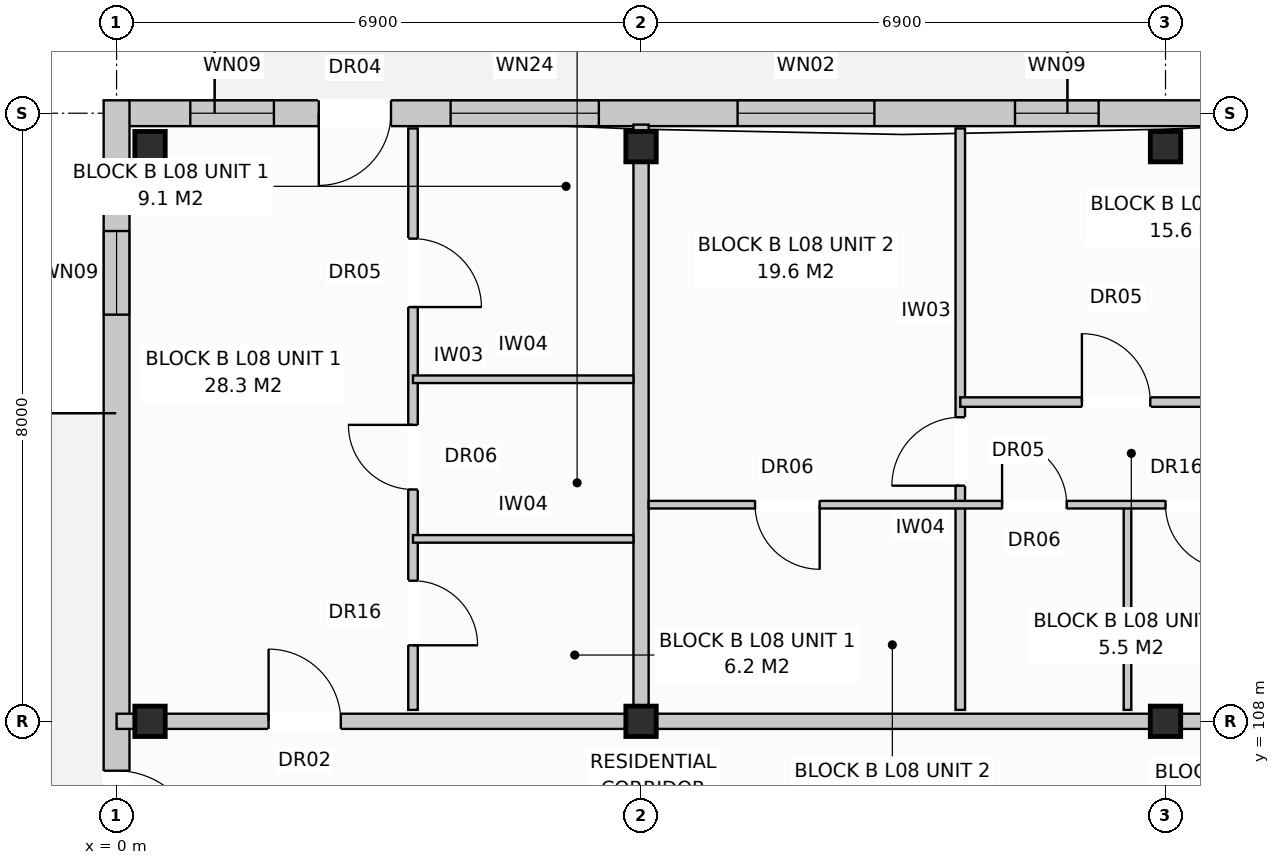
"""IFC4 building model, lengths in metres.
Left out: names, types, materials, properties, quantities, classifications, styles, units other than length and angle.
Written with IfcOpenShell. Run it as: python <this file> out.ifc"""

import sys

from ifc_helpers import new_model, si_unit, direction, frame, frame_2d, origin, origin_with_axes, origin_2d, place, context, subcontext, project, spatial, rectangle, extrude, element, fill, save


model = new_model("IFC4")
c1 = context("Model", 3, precision=1e-05, world=origin(), true_north=direction((0.0, 1.0)))
c2 = subcontext(c1, "Body", "Model", "MODEL_VIEW")
j1 = project(units=[si_unit("LENGTHUNIT", "METRE"), si_unit("PLANEANGLEUNIT", "RADIAN")], contexts=[c1])
p1 = place(None, origin())
s1 = spatial("IfcSite", under=j1, at=p1, CompositionType="ELEMENT")
p2 = place(p1, origin())
s2 = spatial("IfcBuilding", under=s1, at=p2, CompositionType="ELEMENT")
p3 = place(p2, frame((0.0, 0.0, 27.2)))
s3 = spatial("IfcBuildingStorey", under=s2, at=p3, CompositionType="ELEMENT", Elevation=27.2)
for number, where, z_axis, x_axis in (
    (1, (0.44, 108.0, 0.0), (0.0, 0.0, 1.0), (1.0, 0.0, 0.0)),
    (2, (0.44, 115.56, 0.0), (0.0, 0.0, 1.0), (1.0, 0.0, 0.0)),
    (3, (6.9, 108.0, 0.0), (0.0, 0.0, 1.0), (1.0, 0.0, 0.0)),
    (4, (6.9, 115.56, 0.0), (0.0, 0.0, 1.0), (1.0, 0.0, 0.0)),
    (5, (13.8, 108.0, 0.0), (0.0, 0.0, 1.0), (1.0, 0.0, 0.0)),
    (6, (13.8, 115.56, 0.0), (0.0, 0.0, 1.0), (1.0, 0.0, 0.0)),
):
    element("IfcColumn", number, at=place(p3, frame(where, z_axis=z_axis, x_axis=x_axis)), inside=s3, PredefinedType="COLUMN", context=c2, shape_type="SweptSolid", body=[
        extrude(rectangle(XDim=0.4, YDim=0.4, at=origin_2d()), origin(), (0.0, 0.0, 1.0), 3.2),
    ])
p4 = place(p3, frame((0.16, 116.0, 0.0), z_axis=(0.0, 0.0, 1.0), x_axis=(1.0, 0.0, 0.0)))
e7 = element("IfcWall", 7, at=p4, inside=s3, PredefinedType="STANDARD", context=c2, shape_type="SweptSolid", body=[
    extrude(rectangle(XDim=41.08, YDim=0.34, at=frame_2d((20.54, 0.0))), origin(), (0.0, 0.0, 1.0), 2.96),
])
p5 = place(p4, frame((2.5, 0.0, 0.0)))
e8 = element("IfcOpeningElement", 8, at=p5, cuts=e7, PredefinedType="OPENING", context=c2, shape_type="SweptSolid", body=[
    extrude(rectangle(XDim=0.95, YDim=2.1, at=frame_2d((0.475, 1.05))), frame((0.0, 0.182, 0.0), z_axis=(0.0, -1.0, 0.0), x_axis=(1.0, 0.0, 0.0)), (0.0, 0.0, 1.0), 0.364),
])
p6 = place(p4, frame((18.91, 0.0, 0.0)))
e9 = element("IfcOpeningElement", 9, at=p6, cuts=e7, PredefinedType="OPENING", context=c2, shape_type="SweptSolid", body=[
    extrude(rectangle(XDim=0.95, YDim=2.1, at=frame_2d((0.475, 1.05))), frame((0.0, 0.182, 0.0), z_axis=(0.0, -1.0, 0.0), x_axis=(1.0, 0.0, 0.0)), (0.0, 0.0, 1.0), 0.364),
])
p7 = place(p4, frame((32.71, 0.0, 0.0)))
e10 = element("IfcOpeningElement", 10, at=p7, cuts=e7, PredefinedType="OPENING", context=c2, shape_type="SweptSolid", body=[
    extrude(rectangle(XDim=0.95, YDim=2.1, at=frame_2d((0.475, 1.05))), frame((0.0, 0.182, 0.0), z_axis=(0.0, -1.0, 0.0), x_axis=(1.0, 0.0, 0.0)), (0.0, 0.0, 1.0), 0.364),
])
p8 = place(p4, frame((0.81, 0.0, 0.72)))
e11 = element("IfcOpeningElement", 11, at=p8, cuts=e7, PredefinedType="OPENING", context=c2, shape_type="SweptSolid", body=[
    extrude(rectangle(XDim=1.1, YDim=1.5, at=frame_2d((0.55, 0.75))), frame((0.0, 0.182, 0.0), z_axis=(0.0, -1.0, 0.0), x_axis=(1.0, 0.0, 0.0)), (0.0, 0.0, 1.0), 0.364),
])
p9 = place(p4, frame((4.235, 0.0, 0.8)))
e12 = element("IfcOpeningElement", 12, at=p9, cuts=e7, PredefinedType="OPENING", context=c2, shape_type="SweptSolid", body=[
    extrude(rectangle(XDim=1.95, YDim=1.65, at=frame_2d((0.975, 0.825))), frame((0.0, 0.182, 0.0), z_axis=(0.0, -1.0, 0.0), x_axis=(1.0, 0.0, 0.0)), (0.0, 0.0, 1.0), 0.364),
])
p10 = place(p4, frame((8.01, 0.0, 0.8)))
e13 = element("IfcOpeningElement", 13, at=p10, cuts=e7, PredefinedType="OPENING", context=c2, shape_type="SweptSolid", body=[
    extrude(rectangle(XDim=1.8, YDim=1.7, at=frame_2d((0.9, 0.85))), frame((0.0, 0.182, 0.0), z_axis=(0.0, -1.0, 0.0), x_axis=(1.0, 0.0, 0.0)), (0.0, 0.0, 1.0), 0.364),
])
p11 = place(p4, frame((11.66, 0.0, 0.72)))
e14 = element("IfcOpeningElement", 14, at=p11, cuts=e7, PredefinedType="OPENING", context=c2, shape_type="SweptSolid", body=[
    extrude(rectangle(XDim=1.1, YDim=1.5, at=frame_2d((0.55, 0.75))), frame((0.0, 0.182, 0.0), z_axis=(0.0, -1.0, 0.0), x_axis=(1.0, 0.0, 0.0)), (0.0, 0.0, 1.0), 0.364),
])
p12 = place(p4, frame((16.735, 0.0, 0.8)))
e15 = element("IfcOpeningElement", 15, at=p12, cuts=e7, PredefinedType="OPENING", context=c2, shape_type="SweptSolid", body=[
    extrude(rectangle(XDim=1.95, YDim=1.65, at=frame_2d((0.975, 0.825))), frame((0.0, 0.182, 0.0), z_axis=(0.0, -1.0, 0.0), x_axis=(1.0, 0.0, 0.0)), (0.0, 0.0, 1.0), 0.364),
])
p13 = place(p4, frame((22.31, 0.0, 0.8)))
e16 = element("IfcOpeningElement", 16, at=p13, cuts=e7, PredefinedType="OPENING", context=c2, shape_type="SweptSolid", body=[
    extrude(rectangle(XDim=1.8, YDim=1.7, at=frame_2d((0.9, 0.85))), frame((0.0, 0.182, 0.0), z_axis=(0.0, -1.0, 0.0), x_axis=(1.0, 0.0, 0.0)), (0.0, 0.0, 1.0), 0.364),
])
p14 = place(p4, frame((28.36, 0.0, 0.72)))
e17 = element("IfcOpeningElement", 17, at=p14, cuts=e7, PredefinedType="OPENING", context=c2, shape_type="SweptSolid", body=[
    extrude(rectangle(XDim=1.1, YDim=1.5, at=frame_2d((0.55, 0.75))), frame((0.0, 0.182, 0.0), z_axis=(0.0, -1.0, 0.0), x_axis=(1.0, 0.0, 0.0)), (0.0, 0.0, 1.0), 0.364),
])
p15 = place(p4, frame((30.435, 0.0, 0.8)))
e18 = element("IfcOpeningElement", 18, at=p15, cuts=e7, PredefinedType="OPENING", context=c2, shape_type="SweptSolid", body=[
    extrude(rectangle(XDim=1.95, YDim=1.65, at=frame_2d((0.975, 0.825))), frame((0.0, 0.182, 0.0), z_axis=(0.0, -1.0, 0.0), x_axis=(1.0, 0.0, 0.0)), (0.0, 0.0, 1.0), 0.364),
])
p16 = place(p4, frame((35.61, 0.0, 0.8)))
e19 = element("IfcOpeningElement", 19, at=p16, cuts=e7, PredefinedType="OPENING", context=c2, shape_type="SweptSolid", body=[
    extrude(rectangle(XDim=1.8, YDim=1.7, at=frame_2d((0.9, 0.85))), frame((0.0, 0.182, 0.0), z_axis=(0.0, -1.0, 0.0), x_axis=(1.0, 0.0, 0.0)), (0.0, 0.0, 1.0), 0.364),
])
p17 = place(p4, frame((39.26, 0.0, 0.72)))
e20 = element("IfcOpeningElement", 20, at=p17, cuts=e7, PredefinedType="OPENING", context=c2, shape_type="SweptSolid", body=[
    extrude(rectangle(XDim=1.1, YDim=1.5, at=frame_2d((0.55, 0.75))), frame((0.0, 0.182, 0.0), z_axis=(0.0, -1.0, 0.0), x_axis=(1.0, 0.0, 0.0)), (0.0, 0.0, 1.0), 0.364),
])
p18 = place(p3, frame((0.0, 97.43, 0.0), z_axis=(0.0, 0.0, 1.0), x_axis=(0.0, 1.0, 0.0)))
e21 = element("IfcWall", 21, at=p18, inside=s3, PredefinedType="STANDARD", context=c2, shape_type="SweptSolid", body=[
    extrude(rectangle(XDim=18.74, YDim=0.34, at=frame_2d((9.37, 0.0))), origin(), (0.0, 0.0, 1.0), 2.96),
])
p19 = place(p18, frame((8.82, 0.0, 0.0)))
e22 = element("IfcOpeningElement", 22, at=p19, cuts=e21, PredefinedType="OPENING", context=c2, shape_type="SweptSolid", body=[
    extrude(rectangle(XDim=1.1, YDim=2.1, at=frame_2d((0.55, 1.05))), frame((0.0, 0.182, 0.0), z_axis=(0.0, -1.0, 0.0), x_axis=(1.0, 0.0, 0.0)), (0.0, 0.0, 1.0), 0.364),
])
p20 = place(p18, frame((1.72, 0.0, 0.72)))
e23 = element("IfcOpeningElement", 23, at=p20, cuts=e21, PredefinedType="OPENING", context=c2, shape_type="SweptSolid", body=[
    extrude(rectangle(XDim=1.1, YDim=1.5, at=frame_2d((0.55, 0.75))), frame((0.0, 0.182, 0.0), z_axis=(0.0, -1.0, 0.0), x_axis=(1.0, 0.0, 0.0)), (0.0, 0.0, 1.0), 0.364),
])
p21 = place(p18, frame((15.92, 0.0, 0.72)))
e24 = element("IfcOpeningElement", 24, at=p21, cuts=e21, PredefinedType="OPENING", context=c2, shape_type="SweptSolid", body=[
    extrude(rectangle(XDim=1.1, YDim=1.5, at=frame_2d((0.55, 0.75))), frame((0.0, 0.182, 0.0), z_axis=(0.0, -1.0, 0.0), x_axis=(1.0, 0.0, 0.0)), (0.0, 0.0, 1.0), 0.364),
])
p22 = place(p3, frame((6.9, 108.15, 0.0), z_axis=(0.0, 0.0, 1.0), x_axis=(0.0, 1.0, 0.0)))
e25 = element("IfcWall", 25, at=p22, inside=s3, PredefinedType="PARTITIONING", context=c2, shape_type="SweptSolid", body=[
    extrude(rectangle(XDim=7.7, YDim=0.2, at=frame_2d((3.85, 0.0))), origin(), (0.0, 0.0, 1.0), 2.4),
])
p23 = place(p3, frame((0.0, 108.0, 0.0), z_axis=(0.0, 0.0, 1.0), x_axis=(1.0, 0.0, 0.0)))
e26 = element("IfcWall", 26, at=p23, inside=s3, PredefinedType="PARTITIONING", context=c2, shape_type="SweptSolid", body=[
    extrude(rectangle(XDim=6.9, YDim=0.2, at=frame_2d((3.45, 0.0))), origin(), (0.0, 0.0, 1.0), 2.4),
])
p24 = place(p23, frame((2.0, 0.0, 0.0)))
e27 = element("IfcOpeningElement", 27, at=p24, cuts=e26, PredefinedType="OPENING", context=c2, shape_type="SweptSolid", body=[
    extrude(rectangle(XDim=0.95, YDim=2.15, at=frame_2d((0.475, 1.075))), frame((0.0, 0.112, 0.0), z_axis=(0.0, -1.0, 0.0), x_axis=(1.0, 0.0, 0.0)), (0.0, 0.0, 1.0), 0.224),
])
p25 = place(p3, frame((3.9, 108.15, 0.0), z_axis=(0.0, 0.0, 1.0), x_axis=(0.0, 1.0, 0.0)))
e28 = element("IfcWall", 28, at=p25, inside=s3, PredefinedType="PARTITIONING", context=c2, shape_type="SweptSolid", body=[
    extrude(rectangle(XDim=7.65, YDim=0.125, at=frame_2d((3.825, 0.0))), origin(), (0.0, 0.0, 1.0), 2.96),
])
p26 = place(p25, frame((0.85, 0.0, 0.0)))
e29 = element("IfcOpeningElement", 29, at=p26, cuts=e28, PredefinedType="OPENING", context=c2, shape_type="SweptSolid", body=[
    extrude(rectangle(XDim=0.85, YDim=2.1, at=frame_2d((0.425, 1.05))), frame((0.0, 0.074, 0.0), z_axis=(0.0, -1.0, 0.0), x_axis=(1.0, 0.0, 0.0)), (0.0, 0.0, 1.0), 0.149),
])
p27 = place(p25, frame((2.9, 0.0, 0.0)))
e30 = element("IfcOpeningElement", 30, at=p27, cuts=e28, PredefinedType="OPENING", context=c2, shape_type="SweptSolid", body=[
    extrude(rectangle(XDim=0.85, YDim=2.05, at=frame_2d((0.425, 1.025))), frame((0.0, 0.074, 0.0), z_axis=(0.0, -1.0, 0.0), x_axis=(1.0, 0.0, 0.0)), (0.0, 0.0, 1.0), 0.149),
])
p28 = place(p25, frame((5.3, 0.0, 0.0)))
e31 = element("IfcOpeningElement", 31, at=p28, cuts=e28, PredefinedType="OPENING", context=c2, shape_type="SweptSolid", body=[
    extrude(rectangle(XDim=0.9, YDim=2.1, at=frame_2d((0.45, 1.05))), frame((0.0, 0.074, 0.0), z_axis=(0.0, -1.0, 0.0), x_axis=(1.0, 0.0, 0.0)), (0.0, 0.0, 1.0), 0.149),
])
for number, where, z_axis, x_axis in (
    (32, (3.9, 110.4, 0.0), (0.0, 0.0, 1.0), (1.0, 0.0, 0.0)),
    (33, (3.9, 112.5, 0.0), (0.0, 0.0, 1.0), (1.0, 0.0, 0.0)),
):
    element("IfcWall", number, at=place(p3, frame(where, z_axis=z_axis, x_axis=x_axis)), inside=s3, PredefinedType="PARTITIONING", context=c2, shape_type="SweptSolid", body=[
        extrude(rectangle(XDim=2.9, YDim=0.1, at=frame_2d((1.45, 0.0))), origin(), (0.0, 0.0, 1.0), 2.96),
    ])
p29 = place(p3, frame((6.9, 108.0, 0.0), z_axis=(0.0, 0.0, 1.0), x_axis=(1.0, 0.0, 0.0)))
e34 = element("IfcWall", 34, at=p29, inside=s3, PredefinedType="PARTITIONING", context=c2, shape_type="SweptSolid", body=[
    extrude(rectangle(XDim=13.8, YDim=0.2, at=frame_2d((6.9, 0.0))), origin(), (0.0, 0.0, 1.0), 2.4),
])
p30 = place(p29, frame((9.6, 0.0, 0.0)))
e35 = element("IfcOpeningElement", 35, at=p30, cuts=e34, PredefinedType="OPENING", context=c2, shape_type="SweptSolid", body=[
    extrude(rectangle(XDim=0.95, YDim=2.15, at=frame_2d((0.475, 1.075))), frame((0.0, 0.112, 0.0), z_axis=(0.0, -1.0, 0.0), x_axis=(1.0, 0.0, 0.0)), (0.0, 0.0, 1.0), 0.224),
])
p31 = place(p3, frame((11.1, 108.15, 0.0), z_axis=(0.0, 0.0, 1.0), x_axis=(0.0, 1.0, 0.0)))
e36 = element("IfcWall", 36, at=p31, inside=s3, PredefinedType="PARTITIONING", context=c2, shape_type="SweptSolid", body=[
    extrude(rectangle(XDim=7.65, YDim=0.125, at=frame_2d((3.825, 0.0))), origin(), (0.0, 0.0, 1.0), 2.96),
])
p32 = place(p31, frame((2.95, 0.0, 0.0)))
e37 = element("IfcOpeningElement", 37, at=p32, cuts=e36, PredefinedType="OPENING", context=c2, shape_type="SweptSolid", body=[
    extrude(rectangle(XDim=0.9, YDim=2.1, at=frame_2d((0.45, 1.05))), frame((0.0, 0.074, 0.0), z_axis=(0.0, -1.0, 0.0), x_axis=(1.0, 0.0, 0.0)), (0.0, 0.0, 1.0), 0.149),
])
p33 = place(p3, frame((13.3, 108.15, 0.0), z_axis=(0.0, 0.0, 1.0), x_axis=(0.0, 1.0, 0.0)))
e38 = element("IfcWall", 38, at=p33, inside=s3, PredefinedType="PARTITIONING", context=c2, shape_type="SweptSolid", body=[
    extrude(rectangle(XDim=2.7, YDim=0.1, at=frame_2d((1.35, 0.0))), origin(), (0.0, 0.0, 1.0), 2.96),
])
p34 = place(p3, frame((7.0, 110.85, 0.0), z_axis=(0.0, 0.0, 1.0), x_axis=(1.0, 0.0, 0.0)))
e39 = element("IfcWall", 39, at=p34, inside=s3, PredefinedType="PARTITIONING", context=c2, shape_type="SweptSolid", body=[
    extrude(rectangle(XDim=8.6, YDim=0.1, at=frame_2d((4.3, 0.0))), origin(), (0.0, 0.0, 1.0), 2.96),
])
p35 = place(p34, frame((1.4, 0.0, 0.0)))
e40 = element("IfcOpeningElement", 40, at=p35, cuts=e39, PredefinedType="OPENING", context=c2, shape_type="SweptSolid", body=[
    extrude(rectangle(XDim=0.85, YDim=2.05, at=frame_2d((0.425, 1.025))), frame((0.0, 0.062, 0.0), z_axis=(0.0, -1.0, 0.0), x_axis=(1.0, 0.0, 0.0)), (0.0, 0.0, 1.0), 0.124),
])
p36 = place(p34, frame((4.65, 0.0, 0.0)))
e41 = element("IfcOpeningElement", 41, at=p36, cuts=e39, PredefinedType="OPENING", context=c2, shape_type="SweptSolid", body=[
    extrude(rectangle(XDim=0.85, YDim=2.05, at=frame_2d((0.425, 1.025))), frame((0.0, 0.062, 0.0), z_axis=(0.0, -1.0, 0.0), x_axis=(1.0, 0.0, 0.0)), (0.0, 0.0, 1.0), 0.124),
])
p37 = place(p34, frame((6.8, 0.0, 0.0)))
e42 = element("IfcOpeningElement", 42, at=p37, cuts=e39, PredefinedType="OPENING", context=c2, shape_type="SweptSolid", body=[
    extrude(rectangle(XDim=0.85, YDim=2.1, at=frame_2d((0.425, 1.05))), frame((0.0, 0.062, 0.0), z_axis=(0.0, -1.0, 0.0), x_axis=(1.0, 0.0, 0.0)), (0.0, 0.0, 1.0), 0.124),
])
p38 = place(p3, frame((11.1, 112.2, 0.0), z_axis=(0.0, 0.0, 1.0), x_axis=(1.0, 0.0, 0.0)))
e43 = element("IfcWall", 43, at=p38, inside=s3, PredefinedType="PARTITIONING", context=c2, shape_type="SweptSolid", body=[
    extrude(rectangle(XDim=4.5, YDim=0.125, at=frame_2d((2.25, 0.0))), origin(), (0.0, 0.0, 1.0), 2.96),
])
p39 = place(p38, frame((1.6, 0.0, 0.0)))
e44 = element("IfcOpeningElement", 44, at=p39, cuts=e43, PredefinedType="OPENING", context=c2, shape_type="SweptSolid", body=[
    extrude(rectangle(XDim=0.9, YDim=2.1, at=frame_2d((0.45, 1.05))), frame((0.0, 0.074, 0.0), z_axis=(0.0, -1.0, 0.0), x_axis=(1.0, 0.0, 0.0)), (0.0, 0.0, 1.0), 0.149),
])
p40 = place(p5, frame((0.95, 0.0, 0.0), z_axis=(0.0, 0.0, 1.0), x_axis=(-1.0, 0.0, 0.0)))
e45 = element("IfcDoor", 45, at=p40, inside=s3, OperationType="SINGLE_SWING_LEFT", PredefinedType="DOOR", context=c2, shape_type="SweptSolid", body=[
    extrude(rectangle(XDim=0.95, YDim=2.1, at=frame_2d((0.475, 1.05))), frame((0.0, 0.025, 0.0), z_axis=(0.0, -1.0, 0.0), x_axis=(1.0, 0.0, 0.0)), (0.0, 0.0, 1.0), 0.05),
])
fill(e8, e45)
p41 = place(p8, origin_with_axes())
e46 = element("IfcWindow", 46, at=p41, inside=s3, PartitioningType="SINGLE_PANEL", PredefinedType="WINDOW", context=c2, shape_type="SweptSolid", body=[
    extrude(rectangle(XDim=1.1, YDim=1.5, at=frame_2d((0.55, 0.75))), frame((0.0, 0.03, 0.0), z_axis=(0.0, -1.0, 0.0), x_axis=(1.0, 0.0, 0.0)), (0.0, 0.0, 1.0), 0.06),
])
fill(e11, e46)
p42 = place(p9, origin_with_axes())
e47 = element("IfcWindow", 47, at=p42, inside=s3, PartitioningType="SINGLE_PANEL", PredefinedType="WINDOW", context=c2, shape_type="SweptSolid", body=[
    extrude(rectangle(XDim=1.95, YDim=1.65, at=frame_2d((0.975, 0.825))), frame((0.0, 0.03, 0.0), z_axis=(0.0, -1.0, 0.0), x_axis=(1.0, 0.0, 0.0)), (0.0, 0.0, 1.0), 0.06),
])
fill(e12, e47)
p43 = place(p10, origin_with_axes())
e48 = element("IfcWindow", 48, at=p43, inside=s3, PartitioningType="SINGLE_PANEL", PredefinedType="WINDOW", context=c2, shape_type="SweptSolid", body=[
    extrude(rectangle(XDim=1.8, YDim=1.7, at=frame_2d((0.9, 0.85))), frame((0.0, 0.03, 0.0), z_axis=(0.0, -1.0, 0.0), x_axis=(1.0, 0.0, 0.0)), (0.0, 0.0, 1.0), 0.06),
])
fill(e13, e48)
p44 = place(p11, origin_with_axes())
e49 = element("IfcWindow", 49, at=p44, inside=s3, PartitioningType="SINGLE_PANEL", PredefinedType="WINDOW", context=c2, shape_type="SweptSolid", body=[
    extrude(rectangle(XDim=1.1, YDim=1.5, at=frame_2d((0.55, 0.75))), frame((0.0, 0.03, 0.0), z_axis=(0.0, -1.0, 0.0), x_axis=(1.0, 0.0, 0.0)), (0.0, 0.0, 1.0), 0.06),
])
fill(e14, e49)
p45 = place(p19, frame((1.1, 0.0, 0.0), z_axis=(0.0, 0.0, 1.0), x_axis=(-1.0, 0.0, 0.0)))
e50 = element("IfcDoor", 50, at=p45, inside=s3, OperationType="SINGLE_SWING_LEFT", PredefinedType="DOOR", context=c2, shape_type="SweptSolid", body=[
    extrude(rectangle(XDim=1.1, YDim=2.1, at=frame_2d((0.55, 1.05))), frame((0.0, 0.025, 0.0), z_axis=(0.0, -1.0, 0.0), x_axis=(1.0, 0.0, 0.0)), (0.0, 0.0, 1.0), 0.05),
])
fill(e22, e50)
p46 = place(p21, origin_with_axes())
e51 = element("IfcWindow", 51, at=p46, inside=s3, PartitioningType="SINGLE_PANEL", PredefinedType="WINDOW", context=c2, shape_type="SweptSolid", body=[
    extrude(rectangle(XDim=1.1, YDim=1.5, at=frame_2d((0.55, 0.75))), frame((0.0, 0.03, 0.0), z_axis=(0.0, -1.0, 0.0), x_axis=(1.0, 0.0, 0.0)), (0.0, 0.0, 1.0), 0.06),
])
fill(e24, e51)
p47 = place(p24, origin_with_axes())
e52 = element("IfcDoor", 52, at=p47, inside=s3, OperationType="SINGLE_SWING_LEFT", PredefinedType="DOOR", context=c2, shape_type="SweptSolid", body=[
    extrude(rectangle(XDim=0.95, YDim=2.15, at=frame_2d((0.475, 1.075))), frame((0.0, 0.025, 0.0), z_axis=(0.0, -1.0, 0.0), x_axis=(1.0, 0.0, 0.0)), (0.0, 0.0, 1.0), 0.05),
])
fill(e27, e52)
p48 = place(p26, frame((0.85, 0.0, 0.0), z_axis=(0.0, 0.0, 1.0), x_axis=(-1.0, 0.0, 0.0)))
e53 = element("IfcDoor", 53, at=p48, inside=s3, OperationType="SINGLE_SWING_LEFT", PredefinedType="DOOR", context=c2, shape_type="SweptSolid", body=[
    extrude(rectangle(XDim=0.85, YDim=2.1, at=frame_2d((0.425, 1.05))), frame((0.0, 0.025, 0.0), z_axis=(0.0, -1.0, 0.0), x_axis=(1.0, 0.0, 0.0)), (0.0, 0.0, 1.0), 0.05),
])
fill(e29, e53)
p49 = place(p27, origin_with_axes())
e54 = element("IfcDoor", 54, at=p49, inside=s3, OperationType="SINGLE_SWING_RIGHT", PredefinedType="DOOR", context=c2, shape_type="SweptSolid", body=[
    extrude(rectangle(XDim=0.85, YDim=2.05, at=frame_2d((0.425, 1.025))), frame((0.0, 0.025, 0.0), z_axis=(0.0, -1.0, 0.0), x_axis=(1.0, 0.0, 0.0)), (0.0, 0.0, 1.0), 0.05),
])
fill(e30, e54)
p50 = place(p28, frame((0.9, 0.0, 0.0), z_axis=(0.0, 0.0, 1.0), x_axis=(-1.0, 0.0, 0.0)))
e55 = element("IfcDoor", 55, at=p50, inside=s3, OperationType="SINGLE_SWING_LEFT", PredefinedType="DOOR", context=c2, shape_type="SweptSolid", body=[
    extrude(rectangle(XDim=0.9, YDim=2.1, at=frame_2d((0.45, 1.05))), frame((0.0, 0.025, 0.0), z_axis=(0.0, -1.0, 0.0), x_axis=(1.0, 0.0, 0.0)), (0.0, 0.0, 1.0), 0.05),
])
fill(e31, e55)
p51 = place(p32, origin_with_axes())
e56 = element("IfcDoor", 56, at=p51, inside=s3, OperationType="SINGLE_SWING_LEFT", PredefinedType="DOOR", context=c2, shape_type="SweptSolid", body=[
    extrude(rectangle(XDim=0.9, YDim=2.1, at=frame_2d((0.45, 1.05))), frame((0.0, 0.025, 0.0), z_axis=(0.0, -1.0, 0.0), x_axis=(1.0, 0.0, 0.0)), (0.0, 0.0, 1.0), 0.05),
])
fill(e37, e56)
p52 = place(p35, frame((0.85, 0.0, 0.0), z_axis=(0.0, 0.0, 1.0), x_axis=(-1.0, 0.0, 0.0)))
e57 = element("IfcDoor", 57, at=p52, inside=s3, OperationType="SINGLE_SWING_RIGHT", PredefinedType="DOOR", context=c2, shape_type="SweptSolid", body=[
    extrude(rectangle(XDim=0.85, YDim=2.05, at=frame_2d((0.425, 1.025))), frame((0.0, 0.025, 0.0), z_axis=(0.0, -1.0, 0.0), x_axis=(1.0, 0.0, 0.0)), (0.0, 0.0, 1.0), 0.05),
])
fill(e40, e57)
p53 = place(p36, origin_with_axes())
e58 = element("IfcDoor", 58, at=p53, inside=s3, OperationType="SINGLE_SWING_LEFT", PredefinedType="DOOR", context=c2, shape_type="SweptSolid", body=[
    extrude(rectangle(XDim=0.85, YDim=2.05, at=frame_2d((0.425, 1.025))), frame((0.0, 0.025, 0.0), z_axis=(0.0, -1.0, 0.0), x_axis=(1.0, 0.0, 0.0)), (0.0, 0.0, 1.0), 0.05),
])
fill(e41, e58)
p54 = place(p37, frame((0.85, 0.0, 0.0), z_axis=(0.0, 0.0, 1.0), x_axis=(-1.0, 0.0, 0.0)))
e59 = element("IfcDoor", 59, at=p54, inside=s3, OperationType="SINGLE_SWING_RIGHT", PredefinedType="DOOR", context=c2, shape_type="SweptSolid", body=[
    extrude(rectangle(XDim=0.85, YDim=2.1, at=frame_2d((0.425, 1.05))), frame((0.0, 0.025, 0.0), z_axis=(0.0, -1.0, 0.0), x_axis=(1.0, 0.0, 0.0)), (0.0, 0.0, 1.0), 0.05),
])
fill(e42, e59)
p55 = place(p39, origin_with_axes())
e60 = element("IfcDoor", 60, at=p55, inside=s3, OperationType="SINGLE_SWING_LEFT", PredefinedType="DOOR", context=c2, shape_type="SweptSolid", body=[
    extrude(rectangle(XDim=0.9, YDim=2.1, at=frame_2d((0.45, 1.05))), frame((0.0, 0.025, 0.0), z_axis=(0.0, -1.0, 0.0), x_axis=(1.0, 0.0, 0.0)), (0.0, 0.0, 1.0), 0.05),
])
fill(e44, e60)
save(model, sys.argv[1])
